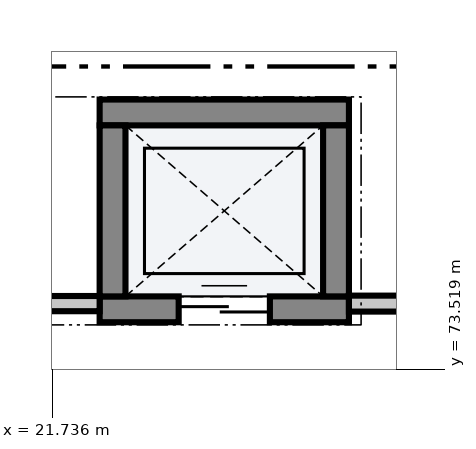
"""IFC4 building model, lengths in metres.
Left out: names, types, materials, properties, quantities, classifications, styles, units other than length and angle.
Written with IfcOpenShell. Run it as: python <this file> out.ifc"""

import sys

from ifc_helpers import new_model, si_unit, direction, frame, frame_2d, origin, place, context, subcontext, project, spatial, rectangle, extrude, element, fill, save


model = new_model("IFC4")
c1 = context("Model", 3, precision=1e-05, world=origin(), true_north=direction((0.0, 1.0)))
c2 = subcontext(c1, "Body", "Model", "MODEL_VIEW")
j1 = project(units=[si_unit("LENGTHUNIT", "METRE"), si_unit("PLANEANGLEUNIT", "RADIAN")], contexts=[c1])
p1 = place(None, origin())
s1 = spatial("IfcSite", under=j1, at=p1, CompositionType="ELEMENT")
p2 = place(p1, origin())
s2 = spatial("IfcBuilding", under=s1, at=p2, CompositionType="ELEMENT")
p3 = place(p2, frame((0.0, 0.0, 10.2)))
s3 = spatial("IfcBuildingStorey", under=s2, at=p3, CompositionType="ELEMENT", Elevation=10.2)
p4 = place(p3, frame((22.36, 74.305, 0.0), z_axis=(0.0, 0.0, 1.0), x_axis=(1.0, 0.0, 0.0)))
e1 = element("IfcWall", 1, at=p4, inside=s3, PredefinedType="SHEAR", context=c2, shape_type="SweptSolid", body=[
    extrude(rectangle(XDim=3.28, YDim=0.34, at=frame_2d((1.64, 0.0))), origin(), (0.0, 0.0, 1.0), 4.515),
])
p5 = place(p4, frame((1.04, 0.0, 0.0)))
e2 = element("IfcOpeningElement", 2, at=p5, cuts=e1, PredefinedType="OPENING", context=c2, shape_type="SweptSolid", body=[
    extrude(rectangle(XDim=1.2, YDim=2.2, at=frame_2d((0.6, 1.1))), frame((0.0, 0.182, 0.0), z_axis=(0.0, -1.0, 0.0), x_axis=(1.0, 0.0, 0.0)), (0.0, 0.0, 1.0), 0.364),
])
p6 = place(p3, frame((22.36, 76.895, 0.0), z_axis=(0.0, 0.0, 1.0), x_axis=(1.0, 0.0, 0.0)))
e3 = element("IfcWall", 3, at=p6, inside=s3, PredefinedType="SHEAR", context=c2, shape_type="SweptSolid", body=[
    extrude(rectangle(XDim=3.28, YDim=0.34, at=frame_2d((1.64, 0.0))), origin(), (0.0, 0.0, 1.0), 4.515),
])
for number, where, z_axis, x_axis in (
    (4, (22.53, 74.475, 0.0), (0.0, 0.0, 1.0), (0.0, 1.0, 0.0)),
    (5, (25.47, 74.475, 0.0), (0.0, 0.0, 1.0), (0.0, 1.0, 0.0)),
):
    element("IfcWall", number, at=place(p3, frame(where, z_axis=z_axis, x_axis=x_axis)), inside=s3, PredefinedType="SHEAR", context=c2, shape_type="SweptSolid", body=[
        extrude(rectangle(XDim=2.25, YDim=0.34, at=frame_2d((1.125, 0.0))), origin(), (0.0, 0.0, 1.0), 4.515),
    ])
p7 = place(p3, frame((48.02, 74.38, 0.0), z_axis=(0.0, 0.0, 1.0), x_axis=(-1.0, 0.0, 0.0)))
e6 = element("IfcWall", 6, at=p7, inside=s3, PredefinedType="PARTITIONING", context=c2, shape_type="SweptSolid", body=[
    extrude(rectangle(XDim=22.38, YDim=0.21, at=frame_2d((11.19, 0.0))), origin(), (0.0, 0.0, 1.0), 3.455),
])
p8 = place(p7, frame((10.462, 0.0, 0.0)))
e7 = element("IfcOpeningElement", 7, at=p8, cuts=e6, PredefinedType="OPENING", context=c2, shape_type="SweptSolid", body=[
    extrude(rectangle(XDim=1.05, YDim=2.1, at=frame_2d((0.525, 1.05))), frame((0.0, 0.117, 0.0), z_axis=(0.0, -1.0, 0.0), x_axis=(1.0, 0.0, 0.0)), (0.0, 0.0, 1.0), 0.234),
])
p9 = place(p3, frame((22.36, 74.38, 0.0), z_axis=(0.0, 0.0, 1.0), x_axis=(-1.0, 0.0, 0.0)))
e8 = element("IfcWall", 8, at=p9, inside=s3, PredefinedType="PARTITIONING", context=c2, shape_type="SweptSolid", body=[
    extrude(rectangle(XDim=6.32, YDim=0.2, at=frame_2d((3.16, 0.0))), origin(), (0.0, 0.0, 1.0), 3.455),
])
p10 = place(p5, origin())
e9 = element("IfcDoor", 9, at=p10, inside=s3, OperationType="DOUBLE_DOOR_SLIDING", PredefinedType="DOOR", context=c2, shape_type="SweptSolid", body=[
    extrude(rectangle(XDim=1.2, YDim=2.2, at=frame_2d((0.6, 1.1))), frame((0.0, 0.025, 0.0), z_axis=(0.0, -1.0, 0.0), x_axis=(1.0, 0.0, 0.0)), (0.0, 0.0, 1.0), 0.05),
])
fill(e2, e9)
save(model, sys.argv[1])
